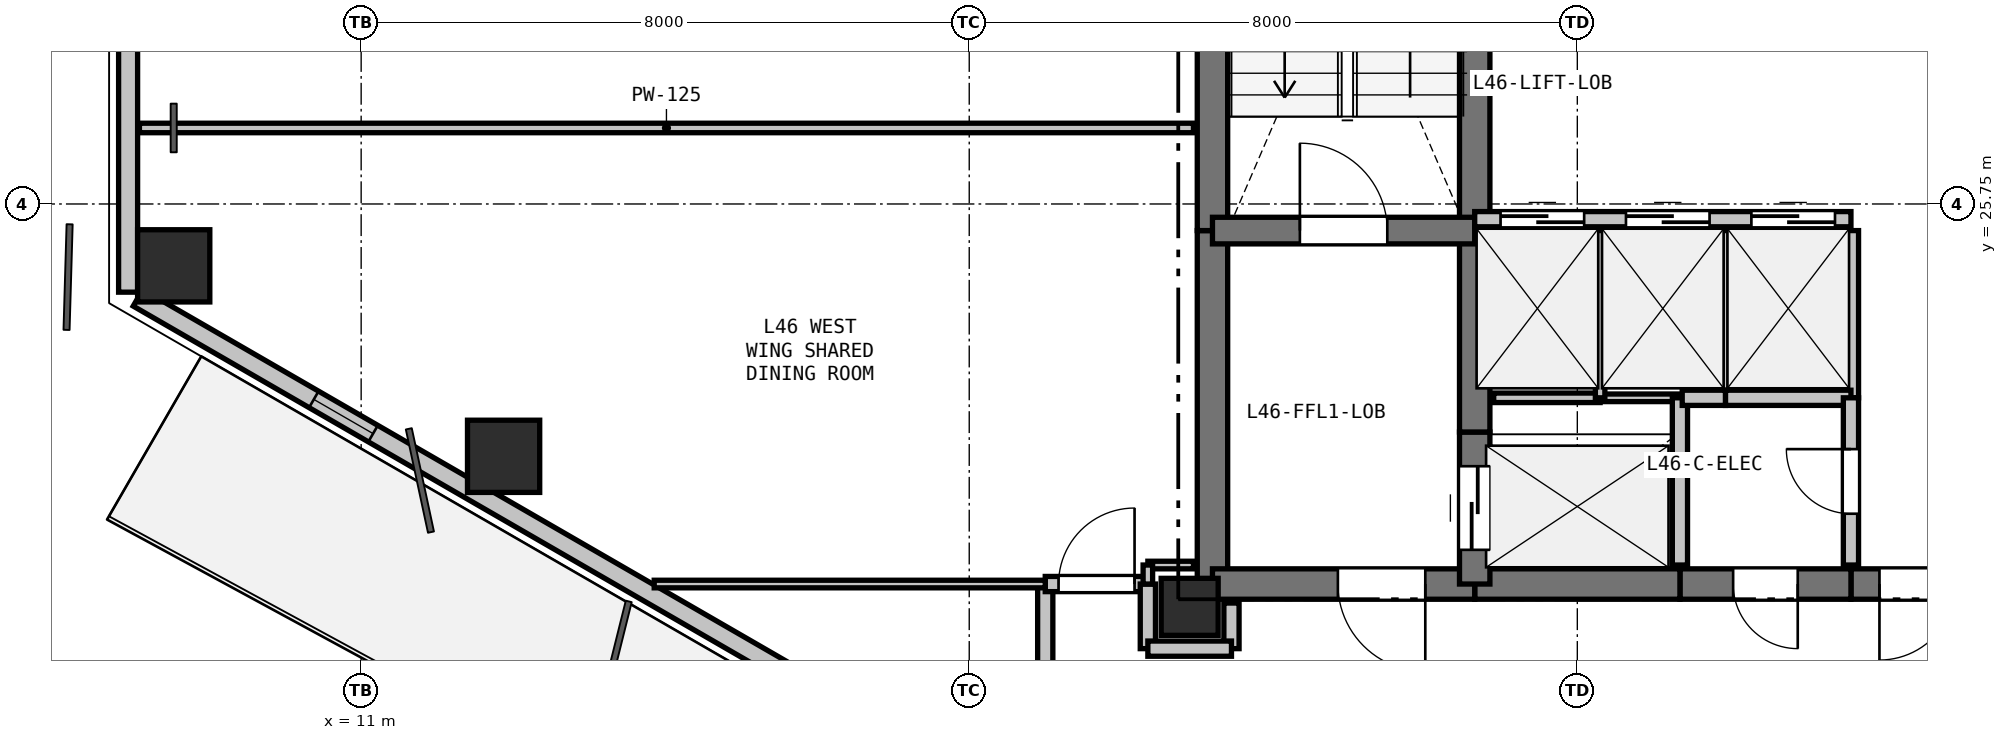
"""IFC4 building model, lengths in metres.
Left out: names, types, materials, properties, quantities, classifications, styles, units other than length and angle.
Written with IfcOpenShell. Run it as: python <this file> out.ifc"""

import sys

from ifc_helpers import new_model, si_unit, direction, frame, frame_2d, origin, origin_2d, place, context, subcontext, project, spatial, rectangle, hollow_rectangle, extrude, element, fill, save


model = new_model("IFC4")
c1 = context("Model", 3, precision=1e-05, world=origin(), true_north=direction((0.0, 1.0)))
c2 = subcontext(c1, "Body", "Model", "MODEL_VIEW")
j1 = project(units=[si_unit("LENGTHUNIT", "METRE"), si_unit("PLANEANGLEUNIT", "RADIAN")], contexts=[c1])
p1 = place(None, origin())
s1 = spatial("IfcSite", under=j1, at=p1, CompositionType="ELEMENT")
p2 = place(p1, origin())
s2 = spatial("IfcBuilding", under=s1, at=p2, CompositionType="ELEMENT")
p3 = place(p2, frame((0.0, 0.0, 167.4)))
s3 = spatial("IfcBuildingStorey", under=s2, at=p3, CompositionType="ELEMENT", Elevation=167.4)
p4 = place(p3, frame((21.9, 20.45, 0.0), z_axis=(0.0, 0.0, 1.0), x_axis=(1.0, 0.0, 0.0)))
e1 = element("IfcColumn", 1, at=p4, inside=s3, PredefinedType="COLUMN", context=c2, shape_type="SweptSolid", body=[
    extrude(rectangle(XDim=0.75, YDim=0.75, at=origin_2d()), origin(), (0.0, 0.0, 1.0), 3.3),
])
for number, where, z_axis, x_axis in (
    (2, (12.874, 22.43, -0.23), (0.0, 0.0, 1.0), (1.0, 0.0, 0.0)),
    (3, (8.534, 24.936, -0.23), (0.0, 0.0, 1.0), (1.0, 0.0, 0.0)),
):
    element("IfcColumn", number, at=place(p3, frame(where, z_axis=z_axis, x_axis=x_axis)), inside=s3, PredefinedType="COLUMN", context=c2, shape_type="SweptSolid", body=[
        extrude(hollow_rectangle(XDim=0.95, YDim=0.95, WallThickness=0.028, at=origin_2d()), origin(), (0.0, 0.0, 1.0), 3.53),
    ])
p5 = place(p3, frame((7.934, 24.59, 0.0), z_axis=(0.0, 0.0, 1.0), x_axis=(0.0, 1.0, 0.0)))
e4 = element("IfcWall", 4, at=p5, inside=s3, PredefinedType="SOLIDWALL", context=c2, shape_type="SweptSolid", body=[
    extrude(rectangle(XDim=4.32, YDim=0.25, at=frame_2d((2.16, 0.0))), origin(), (0.0, 0.0, 1.0), 2.64),
])
p6 = place(p3, frame((17.107, 19.294, 0.0), z_axis=(0.0, 0.0, 1.0), x_axis=(-0.866027516296, 0.499996341005, 0.0)))
e5 = element("IfcWall", 5, at=p6, inside=s3, PredefinedType="SOLIDWALL", context=c2, shape_type="SweptSolid", body=[
    extrude(rectangle(XDim=10.442, YDim=0.25, at=frame_2d((5.221, 0.0))), origin(), (0.0, 0.0, 1.0), 2.64),
])
p7 = place(p6, frame((6.871, 0.0, 0.9)))
e6 = element("IfcOpeningElement", 6, at=p7, cuts=e5, PredefinedType="OPENING", context=c2, shape_type="SweptSolid", body=[
    extrude(rectangle(XDim=0.9, YDim=1.4, at=frame_2d((0.45, 0.7))), frame((0.0, 0.135, 0.0), z_axis=(0.0, -1.0, 0.0), x_axis=(1.0, 0.0, 0.0)), (0.0, 0.0, 1.0), 0.27),
])
p8 = place(p3, frame((22.2, 20.75, 0.0), z_axis=(0.0, 0.0, 1.0), x_axis=(0.0, 1.0, 0.0)))
e7 = element("IfcWall", 7, at=p8, inside=s3, PredefinedType="SHEAR", context=c2, shape_type="SweptSolid", body=[
    extrude(rectangle(XDim=4.65, YDim=0.4, at=frame_2d((2.325, 0.0))), origin(), (0.0, 0.0, 1.0), 3.02),
])
p9 = place(p3, frame((22.2, 25.4, 0.0), z_axis=(0.0, 0.0, 1.0), x_axis=(0.0, 1.0, 0.0)))
e8 = element("IfcWall", 8, at=p9, inside=s3, PredefinedType="SHEAR", context=c2, shape_type="SweptSolid", body=[
    extrude(rectangle(XDim=7.35, YDim=0.4, at=frame_2d((3.675, 0.0))), origin(), (0.0, 0.0, 1.0), 3.02),
])
p10 = place(p3, frame((32.35, 20.75, 0.0), z_axis=(0.0, 0.0, 1.0), x_axis=(-1.0, 0.0, 0.0)))
e9 = element("IfcWall", 9, at=p10, inside=s3, PredefinedType="SHEAR", context=c2, shape_type="SweptSolid", body=[
    extrude(rectangle(XDim=1.75, YDim=0.4, at=frame_2d((0.875, 0.0))), origin(), (0.0, 0.0, 1.0), 3.02),
])
p11 = place(p10, frame((0.375, 0.0, 0.0)))
e10 = element("IfcOpeningElement", 10, at=p11, cuts=e9, PredefinedType="OPENING", context=c2, shape_type="SweptSolid", body=[
    extrude(rectangle(XDim=1.0, YDim=2.15, at=frame_2d((0.5, 1.075))), frame((0.0, 0.21, 0.0), z_axis=(0.0, -1.0, 0.0), x_axis=(1.0, 0.0, 0.0)), (0.0, 0.0, 1.0), 0.42),
])
p12 = place(p3, frame((30.6, 20.75, 0.0), z_axis=(0.0, 0.0, 1.0), x_axis=(-1.0, 0.0, 0.0)))
e11 = element("IfcWall", 11, at=p12, inside=s3, PredefinedType="SHEAR", context=c2, shape_type="SweptSolid", body=[
    extrude(rectangle(XDim=2.25, YDim=0.4, at=frame_2d((1.125, 0.0))), origin(), (0.0, 0.0, 1.0), 3.02),
])
p13 = place(p12, frame((0.7, 0.0, 0.0)))
e12 = element("IfcOpeningElement", 12, at=p13, cuts=e11, PredefinedType="OPENING", context=c2, shape_type="SweptSolid", body=[
    extrude(rectangle(XDim=0.85, YDim=2.1, at=frame_2d((0.425, 1.05))), frame((0.0, 0.21, 0.0), z_axis=(0.0, -1.0, 0.0), x_axis=(1.0, 0.0, 0.0)), (0.0, 0.0, 1.0), 0.42),
])
p14 = place(p3, frame((28.35, 20.75, 0.0), z_axis=(0.0, 0.0, 1.0), x_axis=(-1.0, 0.0, 0.0)))
e13 = element("IfcWall", 13, at=p14, inside=s3, PredefinedType="SHEAR", context=c2, shape_type="SweptSolid", body=[
    extrude(rectangle(XDim=2.7, YDim=0.4, at=frame_2d((1.35, 0.0))), origin(), (0.0, 0.0, 1.0), 3.02),
])
p15 = place(p3, frame((25.65, 20.75, 0.0), z_axis=(0.0, 0.0, 1.0), x_axis=(-1.0, 0.0, 0.0)))
e14 = element("IfcWall", 14, at=p15, inside=s3, PredefinedType="SHEAR", context=c2, shape_type="SweptSolid", body=[
    extrude(rectangle(XDim=3.45, YDim=0.4, at=frame_2d((1.725, 0.0))), origin(), (0.0, 0.0, 1.0), 3.02),
])
p16 = place(p15, frame((0.65, 0.0, 0.0)))
e15 = element("IfcOpeningElement", 15, at=p16, cuts=e14, PredefinedType="OPENING", context=c2, shape_type="SweptSolid", body=[
    extrude(rectangle(XDim=1.15, YDim=2.15, at=frame_2d((0.575, 1.075))), frame((0.0, 0.21, 0.0), z_axis=(0.0, -1.0, 0.0), x_axis=(1.0, 0.0, 0.0)), (0.0, 0.0, 1.0), 0.42),
])
p17 = place(p3, frame((25.65, 20.75, 0.0), z_axis=(0.0, 0.0, 1.0), x_axis=(0.0, 1.0, 0.0)))
e16 = element("IfcWall", 16, at=p17, inside=s3, PredefinedType="SHEAR", context=c2, shape_type="SweptSolid", body=[
    extrude(rectangle(XDim=2.0, YDim=0.4, at=frame_2d((1.0, 0.0))), origin(), (0.0, 0.0, 1.0), 3.02),
])
p18 = place(p17, frame((0.45, 0.0, 0.0)))
e17 = element("IfcOpeningElement", 17, at=p18, cuts=e16, PredefinedType="OPENING", context=c2, shape_type="SweptSolid", body=[
    extrude(rectangle(XDim=1.1, YDim=2.15, at=frame_2d((0.55, 1.075))), frame((0.0, 0.21, 0.0), z_axis=(0.0, -1.0, 0.0), x_axis=(1.0, 0.0, 0.0)), (0.0, 0.0, 1.0), 0.42),
])
p19 = place(p3, frame((25.65, 22.75, 0.0), z_axis=(0.0, 0.0, 1.0), x_axis=(0.0, 1.0, 0.0)))
e18 = element("IfcWall", 18, at=p19, inside=s3, PredefinedType="SHEAR", context=c2, shape_type="SweptSolid", body=[
    extrude(rectangle(XDim=2.8, YDim=0.4, at=frame_2d((1.4, 0.0))), origin(), (0.0, 0.0, 1.0), 3.02),
])
p20 = place(p3, frame((25.65, 25.55, 0.0), z_axis=(0.0, 0.0, 1.0), x_axis=(0.0, 1.0, 0.0)))
e19 = element("IfcWall", 19, at=p20, inside=s3, PredefinedType="SHEAR", context=c2, shape_type="SweptSolid", body=[
    extrude(rectangle(XDim=2.4, YDim=0.4, at=frame_2d((1.2, 0.0))), origin(), (0.0, 0.0, 1.0), 3.02),
])
p21 = place(p3, frame((22.2, 25.4, 0.0), z_axis=(0.0, 0.0, 1.0), x_axis=(1.0, 0.0, 0.0)))
e20 = element("IfcWall", 20, at=p21, inside=s3, PredefinedType="SHEAR", context=c2, shape_type="SweptSolid", body=[
    extrude(rectangle(XDim=3.45, YDim=0.35, at=frame_2d((1.725, 0.0))), origin(), (0.0, 0.0, 1.0), 3.02),
])
p22 = place(p21, frame((1.15, 0.0, 0.0)))
e21 = element("IfcOpeningElement", 21, at=p22, cuts=e20, PredefinedType="OPENING", context=c2, shape_type="SweptSolid", body=[
    extrude(rectangle(XDim=1.15, YDim=2.15, at=frame_2d((0.575, 1.075))), frame((0.0, 0.185, 0.0), z_axis=(0.0, -1.0, 0.0), x_axis=(1.0, 0.0, 0.0)), (0.0, 0.0, 1.0), 0.37),
])
p23 = place(p3, frame((25.65, 25.55, 0.0), z_axis=(0.0, 0.0, 1.0), x_axis=(1.0, 0.0, 0.0)))
e22 = element("IfcWall", 22, at=p23, inside=s3, PredefinedType="PARTITIONING", context=c2, shape_type="SweptSolid", body=[
    extrude(rectangle(XDim=4.95, YDim=0.2, at=frame_2d((2.475, 0.0))), origin(), (0.0, 0.0, 1.0), 3.02),
])
p24 = place(p23, frame((0.34, 0.0, 0.0)))
e23 = element("IfcOpeningElement", 23, at=p24, cuts=e22, PredefinedType="OPENING", context=c2, shape_type="SweptSolid", body=[
    extrude(rectangle(XDim=1.1, YDim=2.15, at=frame_2d((0.55, 1.075))), frame((0.0, 0.11, 0.0), z_axis=(0.0, -1.0, 0.0), x_axis=(1.0, 0.0, 0.0)), (0.0, 0.0, 1.0), 0.22),
])
p25 = place(p23, frame((1.99, 0.0, 0.0)))
e24 = element("IfcOpeningElement", 24, at=p25, cuts=e22, PredefinedType="OPENING", context=c2, shape_type="SweptSolid", body=[
    extrude(rectangle(XDim=1.1, YDim=2.15, at=frame_2d((0.55, 1.075))), frame((0.0, 0.11, 0.0), z_axis=(0.0, -1.0, 0.0), x_axis=(1.0, 0.0, 0.0)), (0.0, 0.0, 1.0), 0.22),
])
p26 = place(p23, frame((3.64, 0.0, 0.0)))
e25 = element("IfcOpeningElement", 25, at=p26, cuts=e22, PredefinedType="OPENING", context=c2, shape_type="SweptSolid", body=[
    extrude(rectangle(XDim=1.1, YDim=2.15, at=frame_2d((0.55, 1.075))), frame((0.0, 0.11, 0.0), z_axis=(0.0, -1.0, 0.0), x_axis=(1.0, 0.0, 0.0)), (0.0, 0.0, 1.0), 0.22),
])
p27 = place(p3, frame((25.9, 23.2, 0.0), z_axis=(0.0, 0.0, 1.0), x_axis=(1.0, 0.0, 0.0)))
e26 = element("IfcWall", 26, at=p27, inside=s3, PredefinedType="PARTITIONING", context=c2, shape_type="SweptSolid", body=[
    extrude(rectangle(XDim=1.4, YDim=0.125, at=frame_2d((0.7, 0.0))), origin(), (0.0, 0.0, 1.0), 3.02),
])
p28 = place(p3, frame((27.3, 23.2, 0.0), z_axis=(0.0, 0.0, 1.0), x_axis=(1.0, 0.0, 0.0)))
e27 = element("IfcWall", 27, at=p28, inside=s3, PredefinedType="PARTITIONING", context=c2, shape_type="SweptSolid", body=[
    extrude(rectangle(XDim=1.05, YDim=0.1, at=frame_2d((0.525, 0.0))), origin(), (0.0, 0.0, 1.0), 3.02),
])
p29 = place(p3, frame((28.35, 23.2, 0.0), z_axis=(0.0, 0.0, 1.0), x_axis=(0.0, -1.0, 0.0)))
e28 = element("IfcWall", 28, at=p29, inside=s3, PredefinedType="PARTITIONING", context=c2, shape_type="SweptSolid", body=[
    extrude(rectangle(XDim=2.2, YDim=0.2, at=frame_2d((1.1, 0.0))), origin(), (0.0, 0.0, 1.0), 3.02),
])
p30 = place(p3, frame((27.3, 25.4, 0.0), z_axis=(0.0, 0.0, 1.0), x_axis=(0.0, -1.0, 0.0)))
e29 = element("IfcWall", 29, at=p30, inside=s3, PredefinedType="PARTITIONING", context=c2, shape_type="SweptSolid", body=[
    extrude(rectangle(XDim=2.2, YDim=0.125, at=frame_2d((1.1, 0.0))), origin(), (0.0, 0.0, 1.0), 3.02),
])
p31 = place(p3, frame((28.95, 25.4, 0.0), z_axis=(0.0, 0.0, 1.0), x_axis=(0.0, -1.0, 0.0)))
e30 = element("IfcWall", 30, at=p31, inside=s3, PredefinedType="PARTITIONING", context=c2, shape_type="SweptSolid", body=[
    extrude(rectangle(XDim=2.2, YDim=0.1, at=frame_2d((1.1, 0.0))), origin(), (0.0, 0.0, 1.0), 3.02),
])
p32 = place(p3, frame((28.95, 23.2, 0.0), z_axis=(0.0, 0.0, 1.0), x_axis=(-1.0, 0.0, 0.0)))
e31 = element("IfcWall", 31, at=p32, inside=s3, PredefinedType="PARTITIONING", context=c2, shape_type="SweptSolid", body=[
    extrude(rectangle(XDim=0.57, YDim=0.2, at=frame_2d((0.285, 0.0))), origin(), (0.0, 0.0, 1.0), 3.02),
])
p33 = place(p3, frame((30.6, 25.4, 0.0), z_axis=(0.0, 0.0, 1.0), x_axis=(0.0, -1.0, 0.0)))
e32 = element("IfcWall", 32, at=p33, inside=s3, PredefinedType="PARTITIONING", context=c2, shape_type="SweptSolid", body=[
    extrude(rectangle(XDim=2.2, YDim=0.2, at=frame_2d((1.1, 0.0))), origin(), (0.0, 0.0, 1.0), 3.02),
])
p34 = place(p3, frame((30.6, 23.2, 0.0), z_axis=(0.0, 0.0, 1.0), x_axis=(-1.0, 0.0, 0.0)))
e33 = element("IfcWall", 33, at=p34, inside=s3, PredefinedType="PARTITIONING", context=c2, shape_type="SweptSolid", body=[
    extrude(rectangle(XDim=1.65, YDim=0.2, at=frame_2d((0.825, 0.0))), origin(), (0.0, 0.0, 1.0), 3.02),
])
p35 = place(p3, frame((30.6, 21.0, 0.0), z_axis=(0.0, 0.0, 1.0), x_axis=(0.0, 1.0, 0.0)))
e34 = element("IfcWall", 34, at=p35, inside=s3, PredefinedType="PARTITIONING", context=c2, shape_type="SweptSolid", body=[
    extrude(rectangle(XDim=2.2, YDim=0.2, at=frame_2d((1.1, 0.0))), origin(), (0.0, 0.0, 1.0), 3.02),
])
p36 = place(p35, frame((0.675, 0.0, 0.0)))
e35 = element("IfcOpeningElement", 35, at=p36, cuts=e34, PredefinedType="OPENING", context=c2, shape_type="SweptSolid", body=[
    extrude(rectangle(XDim=0.85, YDim=2.1, at=frame_2d((0.425, 1.05))), frame((0.0, 0.11, 0.0), z_axis=(0.0, -1.0, 0.0), x_axis=(1.0, 0.0, 0.0)), (0.0, 0.0, 1.0), 0.22),
])
p37 = place(p3, frame((22.45, 19.9, 0.0), z_axis=(0.0, 0.0, 1.0), x_axis=(0.0, 1.0, 0.0)))
e36 = element("IfcWall", 36, at=p37, inside=s3, PredefinedType="PARTITIONING", context=c2, shape_type="SweptSolid", body=[
    extrude(rectangle(XDim=0.6, YDim=0.2, at=frame_2d((0.3, 0.0))), origin(), (0.0, 0.0, 1.0), 2.469),
])
p38 = place(p3, frame((20.0, 17.667, 0.0), z_axis=(0.0, 0.0, 1.0), x_axis=(0.0, 1.0, 0.0)))
e37 = element("IfcWall", 37, at=p38, inside=s3, PredefinedType="PARTITIONING", context=c2, shape_type="SweptSolid", body=[
    extrude(rectangle(XDim=3.083, YDim=0.2, at=frame_2d((1.541, 0.0))), origin(), (0.0, 0.0, 1.0), 2.365),
])
p39 = place(p3, frame((20.0, 20.75, 0.0), z_axis=(0.0, 0.0, 1.0), x_axis=(1.0, 0.0, 0.0)))
e38 = element("IfcWall", 38, at=p39, inside=s3, PredefinedType="PARTITIONING", context=c2, shape_type="SweptSolid", body=[
    extrude(rectangle(XDim=1.35, YDim=0.2, at=frame_2d((0.675, 0.0))), origin(), (0.0, 0.0, 1.0), 2.469),
])
p40 = place(p39, frame((0.175, 0.0, 0.0)))
e39 = element("IfcOpeningElement", 39, at=p40, cuts=e38, PredefinedType="OPENING", context=c2, shape_type="SweptSolid", body=[
    extrude(rectangle(XDim=1.0, YDim=2.15, at=frame_2d((0.5, 1.075))), frame((0.0, 0.11, 0.0), z_axis=(0.0, -1.0, 0.0), x_axis=(1.0, 0.0, 0.0)), (0.0, 0.0, 1.0), 0.22),
])
p41 = place(p3, frame((21.35, 20.75, 0.0), z_axis=(0.0, 0.0, 1.0), x_axis=(0.0, -1.0, 0.0)))
e40 = element("IfcWall", 40, at=p41, inside=s3, PredefinedType="PARTITIONING", context=c2, shape_type="SweptSolid", body=[
    extrude(rectangle(XDim=0.85, YDim=0.2, at=frame_2d((0.425, 0.0))), origin(), (0.0, 0.0, 1.0), 2.469),
])
p42 = place(p3, frame((21.35, 19.9, 0.0), z_axis=(0.0, 0.0, 1.0), x_axis=(1.0, 0.0, 0.0)))
e41 = element("IfcWall", 41, at=p42, inside=s3, PredefinedType="PARTITIONING", context=c2, shape_type="SweptSolid", body=[
    extrude(rectangle(XDim=1.1, YDim=0.2, at=frame_2d((0.55, 0.0))), origin(), (0.0, 0.0, 1.0), 2.469),
])
p43 = place(p3, frame((21.95, 26.75, 0.0), z_axis=(0.0, 0.0, 1.0), x_axis=(-1.0, 0.0, 0.0)))
e42 = element("IfcWall", 42, at=p43, inside=s3, PredefinedType="PARTITIONING", context=c2, shape_type="SweptSolid", body=[
    extrude(rectangle(XDim=13.867, YDim=0.125, at=frame_2d((6.934, 0.0))), origin(), (0.0, 0.0, 1.0), 2.545),
])
p44 = place(p3, frame((21.95, 21.0, 0.0), z_axis=(0.0, 0.0, 1.0), x_axis=(-1.0, 0.0, 0.0)))
e43 = element("IfcWall", 43, at=p44, inside=s3, PredefinedType="PARTITIONING", context=c2, shape_type="SweptSolid", body=[
    extrude(rectangle(XDim=0.6, YDim=0.1, at=frame_2d((0.3, 0.0))), origin(), (0.0, 0.0, 1.0), 2.545),
])
p45 = place(p3, frame((21.35, 21.0, 0.0), z_axis=(0.0, 0.0, 1.0), x_axis=(0.0, -1.0, 0.0)))
e44 = element("IfcWall", 44, at=p45, inside=s3, PredefinedType="PARTITIONING", context=c2, shape_type="SweptSolid", body=[
    extrude(rectangle(XDim=0.25, YDim=0.125, at=frame_2d((0.125, 0.0))), origin(), (0.0, 0.0, 1.0), 3.02),
])
p46 = place(p3, frame((20.0, 20.75, 0.0), z_axis=(0.0, 0.0, 1.0), x_axis=(-1.0, 0.0, 0.0)))
e45 = element("IfcWall", 45, at=p46, inside=s3, PredefinedType="PARTITIONING", context=c2, shape_type="SweptSolid", body=[
    extrude(rectangle(XDim=5.145, YDim=0.1, at=frame_2d((2.572, 0.0))), origin(), (0.0, 0.0, 1.0), 2.365),
])
p47 = place(p7, origin())
e46 = element("IfcWindow", 46, at=p47, inside=s3, PartitioningType="SINGLE_PANEL", PredefinedType="WINDOW", context=c2, shape_type="SweptSolid", body=[
    extrude(rectangle(XDim=0.9, YDim=1.4, at=frame_2d((0.45, 0.7))), frame((0.0, 0.03, 0.0), z_axis=(0.0, -1.0, 0.0), x_axis=(1.0, 0.0, 0.0)), (0.0, 0.0, 1.0), 0.06),
])
fill(e6, e46)
p48 = place(p24, origin())
e47 = element("IfcDoor", 47, at=p48, inside=s3, OperationType="SLIDING_TO_LEFT", PredefinedType="DOOR", context=c2, shape_type="SweptSolid", body=[
    extrude(rectangle(XDim=1.1, YDim=2.15, at=frame_2d((0.55, 1.075))), frame((0.0, 0.025, 0.0), z_axis=(0.0, -1.0, 0.0), x_axis=(1.0, 0.0, 0.0)), (0.0, 0.0, 1.0), 0.05),
])
fill(e23, e47)
p49 = place(p25, origin())
e48 = element("IfcDoor", 48, at=p49, inside=s3, OperationType="SLIDING_TO_LEFT", PredefinedType="DOOR", context=c2, shape_type="SweptSolid", body=[
    extrude(rectangle(XDim=1.1, YDim=2.15, at=frame_2d((0.55, 1.075))), frame((0.0, 0.025, 0.0), z_axis=(0.0, -1.0, 0.0), x_axis=(1.0, 0.0, 0.0)), (0.0, 0.0, 1.0), 0.05),
])
fill(e24, e48)
p50 = place(p26, origin())
e49 = element("IfcDoor", 49, at=p50, inside=s3, OperationType="SLIDING_TO_LEFT", PredefinedType="DOOR", context=c2, shape_type="SweptSolid", body=[
    extrude(rectangle(XDim=1.1, YDim=2.15, at=frame_2d((0.55, 1.075))), frame((0.0, 0.025, 0.0), z_axis=(0.0, -1.0, 0.0), x_axis=(1.0, 0.0, 0.0)), (0.0, 0.0, 1.0), 0.05),
])
fill(e25, e49)
p51 = place(p11, origin())
e50 = element("IfcDoor", 50, at=p51, inside=s3, OperationType="SINGLE_SWING_RIGHT", PredefinedType="DOOR", context=c2, shape_type="SweptSolid", body=[
    extrude(rectangle(XDim=1.0, YDim=2.15, at=frame_2d((0.5, 1.075))), frame((0.0, 0.025, 0.0), z_axis=(0.0, -1.0, 0.0), x_axis=(1.0, 0.0, 0.0)), (0.0, 0.0, 1.0), 0.05),
])
fill(e10, e50)
p52 = place(p18, origin())
e51 = element("IfcDoor", 51, at=p52, inside=s3, OperationType="SLIDING_TO_LEFT", PredefinedType="DOOR", context=c2, shape_type="SweptSolid", body=[
    extrude(rectangle(XDim=1.1, YDim=2.15, at=frame_2d((0.55, 1.075))), frame((0.0, 0.025, 0.0), z_axis=(0.0, -1.0, 0.0), x_axis=(1.0, 0.0, 0.0)), (0.0, 0.0, 1.0), 0.05),
])
fill(e17, e51)
p53 = place(p22, origin())
e52 = element("IfcDoor", 52, at=p53, inside=s3, OperationType="SINGLE_SWING_LEFT", PredefinedType="DOOR", context=c2, shape_type="SweptSolid", body=[
    extrude(rectangle(XDim=1.15, YDim=2.15, at=frame_2d((0.575, 1.075))), frame((0.0, 0.025, 0.0), z_axis=(0.0, -1.0, 0.0), x_axis=(1.0, 0.0, 0.0)), (0.0, 0.0, 1.0), 0.05),
])
fill(e21, e52)
p54 = place(p16, origin())
e53 = element("IfcDoor", 53, at=p54, inside=s3, OperationType="SINGLE_SWING_LEFT", PredefinedType="DOOR", context=c2, shape_type="SweptSolid", body=[
    extrude(rectangle(XDim=1.15, YDim=2.15, at=frame_2d((0.575, 1.075))), frame((0.0, 0.025, 0.0), z_axis=(0.0, -1.0, 0.0), x_axis=(1.0, 0.0, 0.0)), (0.0, 0.0, 1.0), 0.05),
])
fill(e15, e53)
p55 = place(p36, origin())
e54 = element("IfcDoor", 54, at=p55, inside=s3, OperationType="SINGLE_SWING_RIGHT", PredefinedType="DOOR", context=c2, shape_type="SweptSolid", body=[
    extrude(rectangle(XDim=0.85, YDim=2.1, at=frame_2d((0.425, 1.05))), frame((0.0, 0.025, 0.0), z_axis=(0.0, -1.0, 0.0), x_axis=(1.0, 0.0, 0.0)), (0.0, 0.0, 1.0), 0.05),
])
fill(e35, e54)
p56 = place(p13, origin())
e55 = element("IfcDoor", 55, at=p56, inside=s3, OperationType="SINGLE_SWING_LEFT", PredefinedType="DOOR", context=c2, shape_type="SweptSolid", body=[
    extrude(rectangle(XDim=0.85, YDim=2.1, at=frame_2d((0.425, 1.05))), frame((0.0, 0.025, 0.0), z_axis=(0.0, -1.0, 0.0), x_axis=(1.0, 0.0, 0.0)), (0.0, 0.0, 1.0), 0.05),
])
fill(e12, e55)
p57 = place(p40, origin())
e56 = element("IfcDoor", 56, at=p57, inside=s3, OperationType="SINGLE_SWING_RIGHT", PredefinedType="DOOR", context=c2, shape_type="SweptSolid", body=[
    extrude(rectangle(XDim=1.0, YDim=2.15, at=frame_2d((0.5, 1.075))), frame((0.0, 0.025, 0.0), z_axis=(0.0, -1.0, 0.0), x_axis=(1.0, 0.0, 0.0)), (0.0, 0.0, 1.0), 0.05),
])
fill(e39, e56)
save(model, sys.argv[1])
